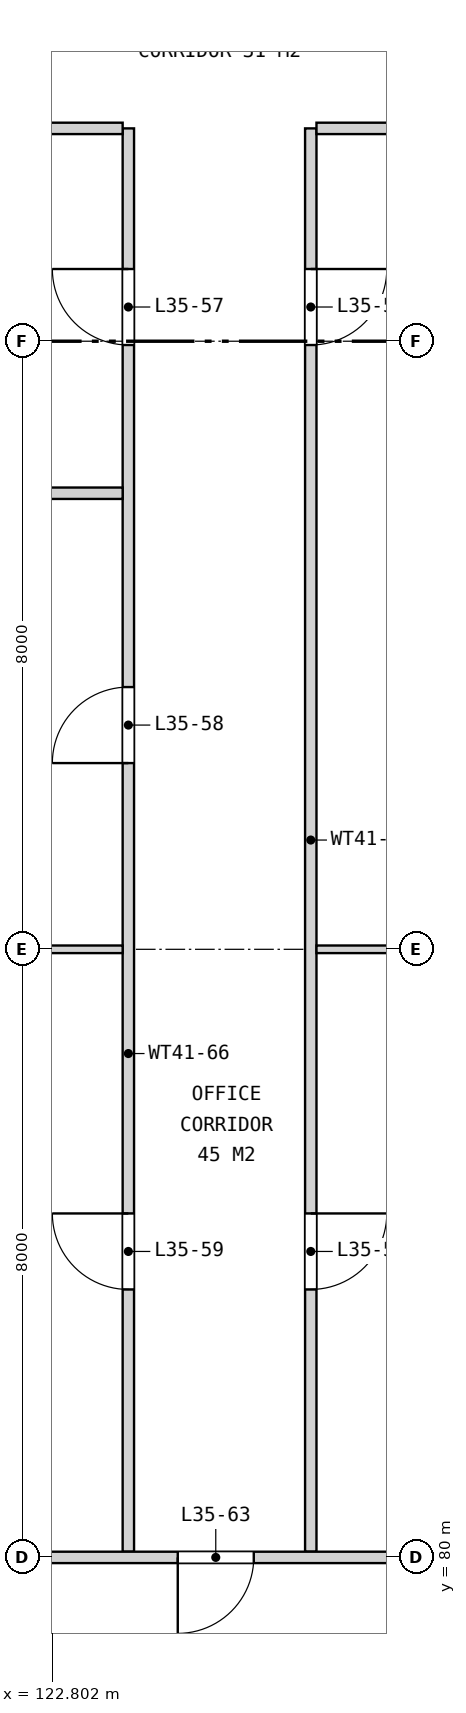
"""IFC4 building model, lengths in metres.
Left out: names, types, materials, properties, quantities, classifications, styles, units other than length and angle.
Written with IfcOpenShell. Run it as: python <this file> out.ifc"""

import sys

from ifc_helpers import new_model, si_unit, direction, frame, frame_2d, origin, place, context, subcontext, project, spatial, rectangle, extrude, element, fill, save


model = new_model("IFC4")
c1 = context("Model", 3, precision=1e-05, world=origin(), true_north=direction((0.0, 1.0)))
c2 = subcontext(c1, "Body", "Model", "MODEL_VIEW")
j1 = project(units=[si_unit("LENGTHUNIT", "METRE"), si_unit("PLANEANGLEUNIT", "RADIAN")], contexts=[c1])
p1 = place(None, origin())
s1 = spatial("IfcSite", under=j1, at=p1, CompositionType="ELEMENT")
p2 = place(p1, origin())
s2 = spatial("IfcBuilding", under=s1, at=p2, CompositionType="ELEMENT")
p3 = place(p2, frame((0.0, 0.0, 167.3)))
s3 = spatial("IfcBuildingStorey", under=s2, at=p3, CompositionType="ELEMENT", Elevation=167.3)
p4 = place(p3, frame((123.8, 80.075, 0.0), z_axis=(0.0, 0.0, 1.0), x_axis=(0.0, 1.0, 0.0)))
e1 = element("IfcWall", 1, at=p4, inside=s3, PredefinedType="PARTITIONING", context=c2, shape_type="SweptSolid", body=[
    extrude(rectangle(XDim=18.725, YDim=0.15, at=frame_2d((9.363, 0.0))), origin(), (0.0, 0.0, 1.0), 3.26),
])
p5 = place(p4, frame((15.875, 0.0, 0.0)))
e2 = element("IfcOpeningElement", 2, at=p5, cuts=e1, PredefinedType="OPENING", context=c2, shape_type="SweptSolid", body=[
    extrude(rectangle(XDim=1.0, YDim=2.1, at=frame_2d((0.5, 1.05))), frame((0.0, 0.085, 0.0), z_axis=(0.0, -1.0, 0.0), x_axis=(1.0, 0.0, 0.0)), (0.0, 0.0, 1.0), 0.17),
])
p6 = place(p4, frame((10.375, 0.0, 0.0)))
e3 = element("IfcOpeningElement", 3, at=p6, cuts=e1, PredefinedType="OPENING", context=c2, shape_type="SweptSolid", body=[
    extrude(rectangle(XDim=1.0, YDim=2.1, at=frame_2d((0.5, 1.05))), frame((0.0, 0.085, 0.0), z_axis=(0.0, -1.0, 0.0), x_axis=(1.0, 0.0, 0.0)), (0.0, 0.0, 1.0), 0.17),
])
p7 = place(p4, frame((3.45, 0.0, 0.0)))
e4 = element("IfcOpeningElement", 4, at=p7, cuts=e1, PredefinedType="OPENING", context=c2, shape_type="SweptSolid", body=[
    extrude(rectangle(XDim=1.0, YDim=2.1, at=frame_2d((0.5, 1.05))), frame((0.0, 0.085, 0.0), z_axis=(0.0, -1.0, 0.0), x_axis=(1.0, 0.0, 0.0)), (0.0, 0.0, 1.0), 0.17),
])
p8 = place(p3, frame((126.2, 80.075, 0.0), z_axis=(0.0, 0.0, 1.0), x_axis=(0.0, 1.0, 0.0)))
e5 = element("IfcWall", 5, at=p8, inside=s3, PredefinedType="PARTITIONING", context=c2, shape_type="SweptSolid", body=[
    extrude(rectangle(XDim=18.725, YDim=0.15, at=frame_2d((9.363, 0.0))), origin(), (0.0, 0.0, 1.0), 3.26),
])
p9 = place(p8, frame((15.875, 0.0, 0.0)))
e6 = element("IfcOpeningElement", 6, at=p9, cuts=e5, PredefinedType="OPENING", context=c2, shape_type="SweptSolid", body=[
    extrude(rectangle(XDim=1.0, YDim=2.1, at=frame_2d((0.5, 1.05))), frame((0.0, 0.085, 0.0), z_axis=(0.0, -1.0, 0.0), x_axis=(1.0, 0.0, 0.0)), (0.0, 0.0, 1.0), 0.17),
])
p10 = place(p8, frame((3.45, 0.0, 0.0)))
e7 = element("IfcOpeningElement", 7, at=p10, cuts=e5, PredefinedType="OPENING", context=c2, shape_type="SweptSolid", body=[
    extrude(rectangle(XDim=1.0, YDim=2.1, at=frame_2d((0.5, 1.05))), frame((0.0, 0.085, 0.0), z_axis=(0.0, -1.0, 0.0), x_axis=(1.0, 0.0, 0.0)), (0.0, 0.0, 1.0), 0.17),
])
p11 = place(p3, frame((112.63, 80.0, 0.0), z_axis=(0.0, 0.0, 1.0), x_axis=(1.0, 0.0, 0.0)))
e8 = element("IfcWall", 8, at=p11, inside=s3, PredefinedType="PARTITIONING", context=c2, shape_type="SweptSolid", body=[
    extrude(rectangle(XDim=24.74, YDim=0.15, at=frame_2d((12.37, 0.0))), origin(), (0.0, 0.0, 1.0), 3.26),
])
p12 = place(p11, frame((11.82, 0.0, 0.0)))
e9 = element("IfcOpeningElement", 9, at=p12, cuts=e8, PredefinedType="OPENING", context=c2, shape_type="SweptSolid", body=[
    extrude(rectangle(XDim=1.0, YDim=2.1, at=frame_2d((0.5, 1.05))), frame((0.0, 0.085, 0.0), z_axis=(0.0, -1.0, 0.0), x_axis=(1.0, 0.0, 0.0)), (0.0, 0.0, 1.0), 0.17),
])
for number, where, z_axis, x_axis in (
    (10, (113.0, 88.0, 0.0), (0.0, 0.0, 1.0), (1.0, 0.0, 0.0)),
    (11, (126.275, 88.0, 0.0), (0.0, 0.0, 1.0), (1.0, 0.0, 0.0)),
):
    element("IfcWall", number, at=place(p3, frame(where, z_axis=z_axis, x_axis=x_axis)), inside=s3, PredefinedType="PARTITIONING", context=c2, shape_type="SweptSolid", body=[
        extrude(rectangle(XDim=10.725, YDim=0.1, at=frame_2d((5.363, 0.0))), origin(), (0.0, 0.0, 1.0), 3.26),
    ])
p13 = place(p3, frame((113.0, 94.0, 0.0), z_axis=(0.0, 0.0, 1.0), x_axis=(1.0, 0.0, 0.0)))
e12 = element("IfcWall", 12, at=p13, inside=s3, PredefinedType="PARTITIONING", context=c2, shape_type="SweptSolid", body=[
    extrude(rectangle(XDim=10.725, YDim=0.15, at=frame_2d((5.363, 0.0))), origin(), (0.0, 0.0, 1.0), 3.26),
])
for number, where, z_axis, x_axis in (
    (13, (118.675, 98.8, 0.0), (0.0, 0.0, 1.0), (1.0, 0.0, 0.0)),
    (14, (126.275, 98.8, 0.0), (0.0, 0.0, 1.0), (1.0, 0.0, 0.0)),
):
    element("IfcWall", number, at=place(p3, frame(where, z_axis=z_axis, x_axis=x_axis)), inside=s3, PredefinedType="PARTITIONING", context=c2, shape_type="SweptSolid", body=[
        extrude(rectangle(XDim=5.05, YDim=0.15, at=frame_2d((2.525, 0.0))), origin(), (0.0, 0.0, 1.0), 3.26),
    ])
p14 = place(p9, frame((1.0, 0.0, 0.0), z_axis=(0.0, 0.0, 1.0), x_axis=(-1.0, 0.0, 0.0)))
e15 = element("IfcDoor", 15, at=p14, inside=s3, OperationType="SINGLE_SWING_LEFT", PredefinedType="DOOR", context=c2, shape_type="SweptSolid", body=[
    extrude(rectangle(XDim=1.0, YDim=2.1, at=frame_2d((0.5, 1.05))), frame((0.0, 0.025, 0.0), z_axis=(0.0, -1.0, 0.0), x_axis=(1.0, 0.0, 0.0)), (0.0, 0.0, 1.0), 0.05),
])
fill(e6, e15)
p15 = place(p10, frame((1.0, 0.0, 0.0), z_axis=(0.0, 0.0, 1.0), x_axis=(-1.0, 0.0, 0.0)))
e16 = element("IfcDoor", 16, at=p15, inside=s3, OperationType="SINGLE_SWING_LEFT", PredefinedType="DOOR", context=c2, shape_type="SweptSolid", body=[
    extrude(rectangle(XDim=1.0, YDim=2.1, at=frame_2d((0.5, 1.05))), frame((0.0, 0.025, 0.0), z_axis=(0.0, -1.0, 0.0), x_axis=(1.0, 0.0, 0.0)), (0.0, 0.0, 1.0), 0.05),
])
fill(e7, e16)
p16 = place(p5, origin())
e17 = element("IfcDoor", 17, at=p16, inside=s3, OperationType="SINGLE_SWING_RIGHT", PredefinedType="DOOR", context=c2, shape_type="SweptSolid", body=[
    extrude(rectangle(XDim=1.0, YDim=2.1, at=frame_2d((0.5, 1.05))), frame((0.0, 0.025, 0.0), z_axis=(0.0, -1.0, 0.0), x_axis=(1.0, 0.0, 0.0)), (0.0, 0.0, 1.0), 0.05),
])
fill(e2, e17)
p17 = place(p6, origin())
e18 = element("IfcDoor", 18, at=p17, inside=s3, OperationType="SINGLE_SWING_LEFT", PredefinedType="DOOR", context=c2, shape_type="SweptSolid", body=[
    extrude(rectangle(XDim=1.0, YDim=2.1, at=frame_2d((0.5, 1.05))), frame((0.0, 0.025, 0.0), z_axis=(0.0, -1.0, 0.0), x_axis=(1.0, 0.0, 0.0)), (0.0, 0.0, 1.0), 0.05),
])
fill(e3, e18)
p18 = place(p7, origin())
e19 = element("IfcDoor", 19, at=p18, inside=s3, OperationType="SINGLE_SWING_RIGHT", PredefinedType="DOOR", context=c2, shape_type="SweptSolid", body=[
    extrude(rectangle(XDim=1.0, YDim=2.1, at=frame_2d((0.5, 1.05))), frame((0.0, 0.025, 0.0), z_axis=(0.0, -1.0, 0.0), x_axis=(1.0, 0.0, 0.0)), (0.0, 0.0, 1.0), 0.05),
])
fill(e4, e19)
p19 = place(p12, frame((1.0, 0.0, 0.0), z_axis=(0.0, 0.0, 1.0), x_axis=(-1.0, 0.0, 0.0)))
e20 = element("IfcDoor", 20, at=p19, inside=s3, OperationType="SINGLE_SWING_RIGHT", PredefinedType="DOOR", context=c2, shape_type="SweptSolid", body=[
    extrude(rectangle(XDim=1.0, YDim=2.1, at=frame_2d((0.5, 1.05))), frame((0.0, 0.025, 0.0), z_axis=(0.0, -1.0, 0.0), x_axis=(1.0, 0.0, 0.0)), (0.0, 0.0, 1.0), 0.05),
])
fill(e9, e20)
save(model, sys.argv[1])
